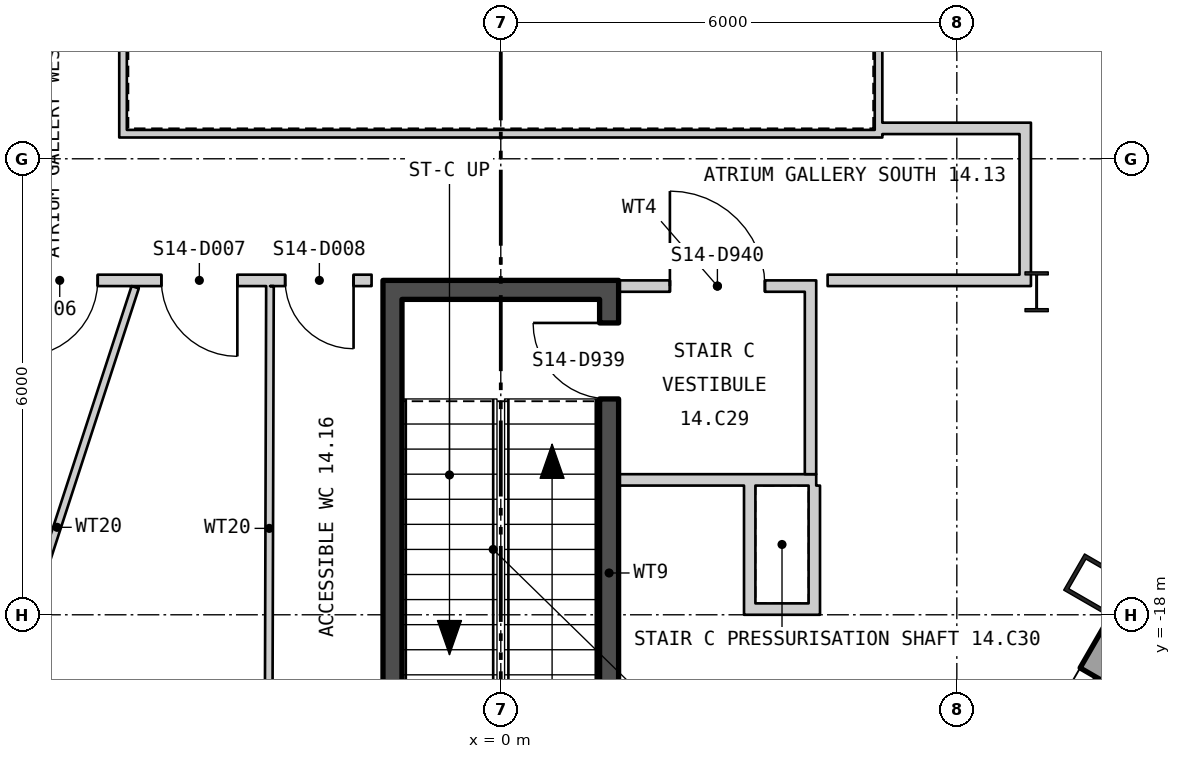
"""IFC4 building model, lengths in metres.
Left out: names, types, materials, properties, quantities, classifications, styles, units other than length and angle.
Written with IfcOpenShell. Run it as: python <this file> out.ifc"""

import sys

from ifc_helpers import new_model, si_unit, direction, frame, frame_2d, origin, origin_2d, place, context, subcontext, project, spatial, polyline, rectangle, hollow_rectangle, i_section, outline, extrude, element, fill, save


model = new_model("IFC4")
c1 = context("Model", 3, precision=1e-05, world=origin(), true_north=direction((0.0, 1.0)))
c2 = subcontext(c1, "Body", "Model", "MODEL_VIEW")
j1 = project(units=[si_unit("LENGTHUNIT", "METRE"), si_unit("PLANEANGLEUNIT", "RADIAN")], contexts=[c1])
p1 = place(None, origin())
s1 = spatial("IfcSite", under=j1, at=p1, CompositionType="ELEMENT")
p2 = place(p1, origin())
s2 = spatial("IfcBuilding", under=s1, at=p2, CompositionType="ELEMENT")
p3 = place(p2, frame((0.0, 0.0, 192.6)))
s3 = spatial("IfcBuildingStorey", under=s2, at=p3, CompositionType="ELEMENT", Elevation=192.6)
p4 = place(p3, frame((7.846, -17.612, 0.0), z_axis=(0.0, 0.0, 1.0), x_axis=(0.5, 0.866025403784, 0.0)))
e1 = element("IfcColumn", 1, at=p4, inside=s3, PredefinedType="COLUMN", context=c2, shape_type="SweptSolid", body=[
    extrude(hollow_rectangle(XDim=0.55, YDim=0.7, WallThickness=0.05, at=origin_2d()), origin(), (0.0, 0.0, 1.0), 3.9),
])
p5 = place(p3, frame((7.05, -13.75, 0.0), z_axis=(0.0, 0.0, 1.0), x_axis=(1.0, 0.0, 0.0)))
e2 = element("IfcColumn", 2, at=p5, inside=s3, PredefinedType="COLUMN", context=c2, shape_type="SweptSolid", body=[
    extrude(i_section(OverallWidth=0.306, OverallDepth=0.524, WebThickness=0.021, FlangeThickness=0.04, at=origin_2d()), origin(), (0.0, 0.0, 1.0), 3.9),
])
p6 = place(p3, frame((-26.54, 13.618, -0.18), z_axis=(0.0, 0.0, 1.0), x_axis=(0.499999764979, -0.866025539474, 0.0)))
e3 = element("IfcWall", 3, at=p6, inside=s3, PredefinedType="SOLIDWALL", context=c2, shape_type="SweptSolid", body=[
    extrude(outline(polyline([(-0.13, -0.225), (45.87, -0.225), (45.61, 0.225), (0.13, 0.225), (-0.13, -0.225)])), origin(), (0.0, 0.0, 1.0), 3.68),
])
p7 = place(p6, frame((1.424, 0.0, 1.08)))
e4 = element("IfcOpeningElement", 4, at=p7, cuts=e3, PredefinedType="OPENING", context=c2, shape_type="SweptSolid", body=[
    extrude(rectangle(XDim=2.4, YDim=2.0, at=frame_2d((1.2, 1.0))), frame((0.0, 0.235, 0.0), z_axis=(0.0, -1.0, 0.0), x_axis=(1.0, 0.0, 0.0)), (0.0, 0.0, 1.0), 0.47),
])
p8 = place(p6, frame((5.893, 0.0, 1.08)))
e5 = element("IfcOpeningElement", 5, at=p8, cuts=e3, PredefinedType="OPENING", context=c2, shape_type="SweptSolid", body=[
    extrude(rectangle(XDim=2.4, YDim=2.0, at=frame_2d((1.2, 1.0))), frame((0.0, 0.235, 0.0), z_axis=(0.0, -1.0, 0.0), x_axis=(1.0, 0.0, 0.0)), (0.0, 0.0, 1.0), 0.47),
])
p9 = place(p6, frame((10.401, 0.0, 1.08)))
e6 = element("IfcOpeningElement", 6, at=p9, cuts=e3, PredefinedType="OPENING", context=c2, shape_type="SweptSolid", body=[
    extrude(rectangle(XDim=2.4, YDim=2.0, at=frame_2d((1.2, 1.0))), frame((0.0, 0.235, 0.0), z_axis=(0.0, -1.0, 0.0), x_axis=(1.0, 0.0, 0.0)), (0.0, 0.0, 1.0), 0.47),
])
p10 = place(p6, frame((14.909, 0.0, 1.08)))
e7 = element("IfcOpeningElement", 7, at=p10, cuts=e3, PredefinedType="OPENING", context=c2, shape_type="SweptSolid", body=[
    extrude(rectangle(XDim=2.4, YDim=2.0, at=frame_2d((1.2, 1.0))), frame((0.0, 0.235, 0.0), z_axis=(0.0, -1.0, 0.0), x_axis=(1.0, 0.0, 0.0)), (0.0, 0.0, 1.0), 0.47),
])
p11 = place(p6, frame((19.416, 0.0, 1.08)))
e8 = element("IfcOpeningElement", 8, at=p11, cuts=e3, PredefinedType="OPENING", context=c2, shape_type="SweptSolid", body=[
    extrude(rectangle(XDim=2.4, YDim=2.0, at=frame_2d((1.2, 1.0))), frame((0.0, 0.235, 0.0), z_axis=(0.0, -1.0, 0.0), x_axis=(1.0, 0.0, 0.0)), (0.0, 0.0, 1.0), 0.47),
])
p12 = place(p6, frame((23.924, 0.0, 1.08)))
e9 = element("IfcOpeningElement", 9, at=p12, cuts=e3, PredefinedType="OPENING", context=c2, shape_type="SweptSolid", body=[
    extrude(rectangle(XDim=2.4, YDim=2.0, at=frame_2d((1.2, 1.0))), frame((0.0, 0.235, 0.0), z_axis=(0.0, -1.0, 0.0), x_axis=(1.0, 0.0, 0.0)), (0.0, 0.0, 1.0), 0.47),
])
p13 = place(p6, frame((28.431, 0.0, 1.08)))
e10 = element("IfcOpeningElement", 10, at=p13, cuts=e3, PredefinedType="OPENING", context=c2, shape_type="SweptSolid", body=[
    extrude(rectangle(XDim=2.4, YDim=2.0, at=frame_2d((1.2, 1.0))), frame((0.0, 0.235, 0.0), z_axis=(0.0, -1.0, 0.0), x_axis=(1.0, 0.0, 0.0)), (0.0, 0.0, 1.0), 0.47),
])
p14 = place(p6, frame((32.939, 0.0, 1.08)))
e11 = element("IfcOpeningElement", 11, at=p14, cuts=e3, PredefinedType="OPENING", context=c2, shape_type="SweptSolid", body=[
    extrude(rectangle(XDim=2.4, YDim=2.0, at=frame_2d((1.2, 1.0))), frame((0.0, 0.235, 0.0), z_axis=(0.0, -1.0, 0.0), x_axis=(1.0, 0.0, 0.0)), (0.0, 0.0, 1.0), 0.47),
])
p15 = place(p6, frame((41.916, 0.0, 1.08)))
e12 = element("IfcOpeningElement", 12, at=p15, cuts=e3, PredefinedType="OPENING", context=c2, shape_type="SweptSolid", body=[
    extrude(rectangle(XDim=2.4, YDim=2.0, at=frame_2d((1.2, 1.0))), frame((0.0, 0.235, 0.0), z_axis=(0.0, -1.0, 0.0), x_axis=(1.0, 0.0, 0.0)), (0.0, 0.0, 1.0), 0.47),
])
p16 = place(p3, frame((3.67, -25.994, -0.18), z_axis=(0.0, 0.0, 1.0), x_axis=(0.499999764979, 0.866025539474, 0.0)))
e13 = element("IfcWall", 13, at=p16, inside=s3, PredefinedType="SOLIDWALL", context=c2, shape_type="SweptSolid", body=[
    extrude(outline(polyline([(-0.13, -0.225), (45.87, -0.225), (45.61, 0.225), (0.13, 0.225), (-0.13, -0.225)])), origin(), (0.0, 0.0, 1.0), 3.68),
])
p17 = place(p16, frame((1.424, 0.0, 1.08)))
e14 = element("IfcOpeningElement", 14, at=p17, cuts=e13, PredefinedType="OPENING", context=c2, shape_type="SweptSolid", body=[
    extrude(rectangle(XDim=2.4, YDim=2.0, at=frame_2d((1.2, 1.0))), frame((0.0, 0.235, 0.0), z_axis=(0.0, -1.0, 0.0), x_axis=(1.0, 0.0, 0.0)), (0.0, 0.0, 1.0), 0.47),
])
p18 = place(p16, frame((5.893, 0.0, 1.08)))
e15 = element("IfcOpeningElement", 15, at=p18, cuts=e13, PredefinedType="OPENING", context=c2, shape_type="SweptSolid", body=[
    extrude(rectangle(XDim=2.4, YDim=2.0, at=frame_2d((1.2, 1.0))), frame((0.0, 0.235, 0.0), z_axis=(0.0, -1.0, 0.0), x_axis=(1.0, 0.0, 0.0)), (0.0, 0.0, 1.0), 0.47),
])
p19 = place(p16, frame((10.401, 0.0, 1.08)))
e16 = element("IfcOpeningElement", 16, at=p19, cuts=e13, PredefinedType="OPENING", context=c2, shape_type="SweptSolid", body=[
    extrude(rectangle(XDim=2.4, YDim=2.0, at=frame_2d((1.2, 1.0))), frame((0.0, 0.235, 0.0), z_axis=(0.0, -1.0, 0.0), x_axis=(1.0, 0.0, 0.0)), (0.0, 0.0, 1.0), 0.47),
])
p20 = place(p16, frame((14.909, 0.0, 1.08)))
e17 = element("IfcOpeningElement", 17, at=p20, cuts=e13, PredefinedType="OPENING", context=c2, shape_type="SweptSolid", body=[
    extrude(rectangle(XDim=2.4, YDim=2.0, at=frame_2d((1.2, 1.0))), frame((0.0, 0.235, 0.0), z_axis=(0.0, -1.0, 0.0), x_axis=(1.0, 0.0, 0.0)), (0.0, 0.0, 1.0), 0.47),
])
p21 = place(p16, frame((19.416, 0.0, 1.08)))
e18 = element("IfcOpeningElement", 18, at=p21, cuts=e13, PredefinedType="OPENING", context=c2, shape_type="SweptSolid", body=[
    extrude(rectangle(XDim=2.4, YDim=2.0, at=frame_2d((1.2, 1.0))), frame((0.0, 0.235, 0.0), z_axis=(0.0, -1.0, 0.0), x_axis=(1.0, 0.0, 0.0)), (0.0, 0.0, 1.0), 0.47),
])
p22 = place(p16, frame((23.924, 0.0, 1.08)))
e19 = element("IfcOpeningElement", 19, at=p22, cuts=e13, PredefinedType="OPENING", context=c2, shape_type="SweptSolid", body=[
    extrude(rectangle(XDim=2.4, YDim=2.0, at=frame_2d((1.2, 1.0))), frame((0.0, 0.235, 0.0), z_axis=(0.0, -1.0, 0.0), x_axis=(1.0, 0.0, 0.0)), (0.0, 0.0, 1.0), 0.47),
])
p23 = place(p16, frame((28.431, 0.0, 1.08)))
e20 = element("IfcOpeningElement", 20, at=p23, cuts=e13, PredefinedType="OPENING", context=c2, shape_type="SweptSolid", body=[
    extrude(rectangle(XDim=2.4, YDim=2.0, at=frame_2d((1.2, 1.0))), frame((0.0, 0.235, 0.0), z_axis=(0.0, -1.0, 0.0), x_axis=(1.0, 0.0, 0.0)), (0.0, 0.0, 1.0), 0.47),
])
p24 = place(p16, frame((32.939, 0.0, 1.08)))
e21 = element("IfcOpeningElement", 21, at=p24, cuts=e13, PredefinedType="OPENING", context=c2, shape_type="SweptSolid", body=[
    extrude(rectangle(XDim=2.4, YDim=2.0, at=frame_2d((1.2, 1.0))), frame((0.0, 0.235, 0.0), z_axis=(0.0, -1.0, 0.0), x_axis=(1.0, 0.0, 0.0)), (0.0, 0.0, 1.0), 0.47),
])
p25 = place(p16, frame((37.447, 0.0, 1.08)))
e22 = element("IfcOpeningElement", 22, at=p25, cuts=e13, PredefinedType="OPENING", context=c2, shape_type="SweptSolid", body=[
    extrude(rectangle(XDim=2.4, YDim=2.0, at=frame_2d((1.2, 1.0))), frame((0.0, 0.235, 0.0), z_axis=(0.0, -1.0, 0.0), x_axis=(1.0, 0.0, 0.0)), (0.0, 0.0, 1.0), 0.47),
])
p26 = place(p16, frame((41.916, 0.0, 1.08)))
e23 = element("IfcOpeningElement", 23, at=p26, cuts=e13, PredefinedType="OPENING", context=c2, shape_type="SweptSolid", body=[
    extrude(rectangle(XDim=2.4, YDim=2.0, at=frame_2d((1.2, 1.0))), frame((0.0, 0.235, 0.0), z_axis=(0.0, -1.0, 0.0), x_axis=(1.0, 0.0, 0.0)), (0.0, 0.0, 1.0), 0.47),
])
p27 = place(p3, frame((-5.02, -11.67, 0.0), z_axis=(0.0, 0.0, 1.0), x_axis=(1.0, 0.0, 0.0)))
e24 = element("IfcWall", 24, at=p27, inside=s3, PredefinedType="PARTITIONING", context=c2, shape_type="SweptSolid", body=[
    extrude(rectangle(XDim=10.04, YDim=0.1, at=frame_2d((5.02, 0.0))), origin(), (0.0, 0.0, 1.0), 3.7),
])
for number, where, z_axis, x_axis in (
    (25, (4.97, -11.62, 0.0), (0.0, 0.0, 1.0), (0.0, 1.0, 0.0)),
    (26, (-4.97, -3.58, 0.0), (0.0, 0.0, 1.0), (0.0, -1.0, 0.0)),
):
    element("IfcWall", number, at=place(p3, frame(where, z_axis=z_axis, x_axis=x_axis)), inside=s3, PredefinedType="PARTITIONING", context=c2, shape_type="SweptSolid", body=[
        extrude(rectangle(XDim=8.04, YDim=0.1, at=frame_2d((4.02, 0.0))), origin(), (0.0, 0.0, 1.0), 3.7),
    ])
p28 = place(p3, frame((-1.425, -21.05, 0.0), z_axis=(0.0, 0.0, 1.0), x_axis=(0.0, 1.0, 0.0)))
e27 = element("IfcWall", 27, at=p28, inside=s3, PredefinedType="SHEAR", context=c2, shape_type="SweptSolid", body=[
    extrude(rectangle(XDim=7.2, YDim=0.25, at=frame_2d((3.6, 0.0))), origin(), (0.0, 0.0, 1.0), 3.7),
])
p29 = place(p3, frame((1.425, -21.05, 0.0), z_axis=(0.0, 0.0, 1.0), x_axis=(0.0, 1.0, 0.0)))
e28 = element("IfcWall", 28, at=p29, inside=s3, PredefinedType="SHEAR", context=c2, shape_type="SweptSolid", body=[
    extrude(rectangle(XDim=7.2, YDim=0.25, at=frame_2d((3.6, 0.0))), origin(), (0.0, 0.0, 1.0), 3.7),
])
p30 = place(p29, frame((5.89, 0.0, 0.0)))
e29 = element("IfcOpeningElement", 29, at=p30, cuts=e28, PredefinedType="OPENING", context=c2, shape_type="SweptSolid", body=[
    extrude(rectangle(XDim=1.0, YDim=2.1, at=frame_2d((0.5, 1.05))), frame((0.0, 0.135, 0.0), z_axis=(0.0, -1.0, 0.0), x_axis=(1.0, 0.0, 0.0)), (0.0, 0.0, 1.0), 0.27),
])
p31 = place(p3, frame((-1.55, -13.725, 0.0), z_axis=(0.0, 0.0, 1.0), x_axis=(1.0, 0.0, 0.0)))
e30 = element("IfcWall", 30, at=p31, inside=s3, PredefinedType="SHEAR", context=c2, shape_type="SweptSolid", body=[
    extrude(rectangle(XDim=3.1, YDim=0.25, at=frame_2d((1.55, 0.0))), origin(), (0.0, 0.0, 1.0), 3.7),
])
p32 = place(p3, frame((1.55, -16.225, 0.0), z_axis=(0.0, 0.0, 1.0), x_axis=(1.0, 0.0, 0.0)))
e31 = element("IfcWall", 31, at=p32, inside=s3, PredefinedType="PARTITIONING", context=c2, shape_type="SweptSolid", body=[
    extrude(rectangle(XDim=2.6, YDim=0.15, at=frame_2d((1.3, 0.0))), origin(), (0.0, 0.0, 1.0), 3.7),
])
p33 = place(p3, frame((4.075, -16.15, 0.0), z_axis=(0.0, 0.0, 1.0), x_axis=(0.0, 1.0, 0.0)))
e32 = element("IfcWall", 32, at=p33, inside=s3, PredefinedType="PARTITIONING", context=c2, shape_type="SweptSolid", body=[
    extrude(rectangle(XDim=2.4, YDim=0.15, at=frame_2d((1.2, 0.0))), origin(), (0.0, 0.0, 1.0), 3.7),
])
p34 = place(p3, frame((1.55, -13.675, 0.0), z_axis=(0.0, 0.0, 1.0), x_axis=(1.0, 0.0, 0.0)))
e33 = element("IfcWall", 33, at=p34, inside=s3, PredefinedType="PARTITIONING", context=c2, shape_type="SweptSolid", body=[
    extrude(rectangle(XDim=2.6, YDim=0.15, at=frame_2d((1.3, 0.0))), origin(), (0.0, 0.0, 1.0), 2.91),
])
p35 = place(p34, frame((0.675, 0.0, 0.0)))
e34 = element("IfcOpeningElement", 34, at=p35, cuts=e33, PredefinedType="OPENING", context=c2, shape_type="SweptSolid", body=[
    extrude(rectangle(XDim=1.25, YDim=2.1, at=frame_2d((0.625, 1.05))), frame((0.0, 0.085, 0.0), z_axis=(0.0, -1.0, 0.0), x_axis=(1.0, 0.0, 0.0)), (0.0, 0.0, 1.0), 0.17),
])
p36 = place(p3, frame((3.275, -18.0, 0.0), z_axis=(0.0, 0.0, 1.0), x_axis=(0.0, 1.0, 0.0)))
e35 = element("IfcWall", 35, at=p36, inside=s3, PredefinedType="PARTITIONING", context=c2, shape_type="SweptSolid", body=[
    extrude(rectangle(XDim=1.7, YDim=0.15, at=frame_2d((0.85, 0.0))), origin(), (0.0, 0.0, 1.0), 3.01),
])
p37 = place(p3, frame((3.35, -17.925, 0.0), z_axis=(0.0, 0.0, 1.0), x_axis=(1.0, 0.0, 0.0)))
e36 = element("IfcWall", 36, at=p37, inside=s3, PredefinedType="PARTITIONING", context=c2, shape_type="SweptSolid", body=[
    extrude(rectangle(XDim=0.7, YDim=0.15, at=frame_2d((0.35, 0.0))), origin(), (0.0, 0.0, 1.0), 3.7),
])
p38 = place(p3, frame((4.125, -18.0, 0.0), z_axis=(0.0, 0.0, 1.0), x_axis=(0.0, 1.0, 0.0)))
e37 = element("IfcWall", 37, at=p38, inside=s3, PredefinedType="PARTITIONING", context=c2, shape_type="SweptSolid", body=[
    extrude(rectangle(XDim=1.7, YDim=0.15, at=frame_2d((0.85, 0.0))), origin(), (0.0, 0.0, 1.0), 3.7),
])
p39 = place(p3, frame((-6.866, -20.008, 0.0), z_axis=(0.0, 0.0, 1.0), x_axis=(0.309446795586, 0.95091675803, 0.0)))
e38 = element("IfcWall", 38, at=p39, inside=s3, PredefinedType="PARTITIONING", context=c2, shape_type="SweptSolid", body=[
    extrude(rectangle(XDim=6.644, YDim=0.1, at=frame_2d((3.322, 0.0))), origin(), (0.0, 0.0, 1.0), 3.7),
])
p40 = place(p3, frame((-6.825, -13.6, 0.0), z_axis=(0.0, 0.0, 1.0), x_axis=(1.0, 0.0, 0.0)))
e39 = element("IfcWall", 39, at=p40, inside=s3, PredefinedType="PARTITIONING", context=c2, shape_type="SweptSolid", body=[
    extrude(rectangle(XDim=5.125, YDim=0.15, at=frame_2d((2.562, 0.0))), origin(), (0.0, 0.0, 1.0), 2.91),
])
p41 = place(p40, frame((0.522, 0.0, 0.0)))
e40 = element("IfcOpeningElement", 40, at=p41, cuts=e39, PredefinedType="OPENING", context=c2, shape_type="SweptSolid", body=[
    extrude(rectangle(XDim=1.0, YDim=2.1, at=frame_2d((0.5, 1.05))), frame((0.0, 0.085, 0.0), z_axis=(0.0, -1.0, 0.0), x_axis=(1.0, 0.0, 0.0)), (0.0, 0.0, 1.0), 0.17),
])
p42 = place(p40, frame((2.359, 0.0, 0.0)))
e41 = element("IfcOpeningElement", 41, at=p42, cuts=e39, PredefinedType="OPENING", context=c2, shape_type="SweptSolid", body=[
    extrude(rectangle(XDim=1.0, YDim=2.1, at=frame_2d((0.5, 1.05))), frame((0.0, 0.085, 0.0), z_axis=(0.0, -1.0, 0.0), x_axis=(1.0, 0.0, 0.0)), (0.0, 0.0, 1.0), 0.17),
])
p43 = place(p40, frame((3.988, 0.0, 0.0)))
e42 = element("IfcOpeningElement", 42, at=p43, cuts=e39, PredefinedType="OPENING", context=c2, shape_type="SweptSolid", body=[
    extrude(rectangle(XDim=0.9, YDim=2.1, at=frame_2d((0.45, 1.05))), frame((0.0, 0.085, 0.0), z_axis=(0.0, -1.0, 0.0), x_axis=(1.0, 0.0, 0.0)), (0.0, 0.0, 1.0), 0.17),
])
p44 = place(p3, frame((-3.056, -20.051, 0.0), z_axis=(0.0, 0.0, 1.0), x_axis=(0.002979911487, 0.999995560054, 0.0)))
e43 = element("IfcWall", 43, at=p44, inside=s3, PredefinedType="PARTITIONING", context=c2, shape_type="SweptSolid", body=[
    extrude(rectangle(XDim=6.376, YDim=0.1, at=frame_2d((3.188, 0.0))), origin(), (0.0, 0.0, 1.0), 3.01),
])
p45 = place(p3, frame((4.3, -13.6, 0.0), z_axis=(0.0, 0.0, 1.0), x_axis=(1.0, 0.0, 0.0)))
e44 = element("IfcWall", 44, at=p45, inside=s3, PredefinedType="PARTITIONING", context=c2, shape_type="SweptSolid", body=[
    extrude(rectangle(XDim=2.675, YDim=0.15, at=frame_2d((1.337, 0.0))), origin(), (0.0, 0.0, 1.0), 2.91),
])
p46 = place(p3, frame((5.02, -11.6, 0.0), z_axis=(0.0, 0.0, 1.0), x_axis=(1.0, 0.0, 0.0)))
e45 = element("IfcWall", 45, at=p46, inside=s3, PredefinedType="PARTITIONING", context=c2, shape_type="SweptSolid", body=[
    extrude(rectangle(XDim=1.805, YDim=0.15, at=frame_2d((0.902, 0.0))), origin(), (0.0, 0.0, 1.0), 3.7),
])
p47 = place(p3, frame((6.9, -13.525, 0.0), z_axis=(0.0, 0.0, 1.0), x_axis=(0.0, 1.0, 0.0)))
e46 = element("IfcWall", 46, at=p47, inside=s3, PredefinedType="PARTITIONING", context=c2, shape_type="SweptSolid", body=[
    extrude(rectangle(XDim=2.0, YDim=0.15, at=frame_2d((1.0, 0.0))), origin(), (0.0, 0.0, 1.0), 3.11),
])
p48 = place(p18, origin())
e47 = element("IfcWindow", 47, at=p48, inside=s3, PartitioningType="SINGLE_PANEL", PredefinedType="WINDOW", context=c2, shape_type="SweptSolid", body=[
    extrude(rectangle(XDim=2.4, YDim=2.0, at=frame_2d((1.2, 1.0))), frame((0.0, 0.105, 0.0), z_axis=(0.0, -1.0, 0.0), x_axis=(1.0, 0.0, 0.0)), (0.0, 0.0, 1.0), 0.06),
])
fill(e15, e47)
p49 = place(p30, origin())
e48 = element("IfcDoor", 48, at=p49, inside=s3, OperationType="SINGLE_SWING_LEFT", PredefinedType="DOOR", context=c2, shape_type="SweptSolid", body=[
    extrude(rectangle(XDim=1.0, YDim=2.1, at=frame_2d((0.5, 1.05))), frame((0.0, 0.025, 0.0), z_axis=(0.0, -1.0, 0.0), x_axis=(1.0, 0.0, 0.0)), (0.0, 0.0, 1.0), 0.05),
])
fill(e29, e48)
p50 = place(p35, origin())
e49 = element("IfcDoor", 49, at=p50, inside=s3, OperationType="SINGLE_SWING_RIGHT", PredefinedType="DOOR", context=c2, shape_type="SweptSolid", body=[
    extrude(rectangle(XDim=1.25, YDim=2.1, at=frame_2d((0.625, 1.05))), frame((0.0, 0.025, 0.0), z_axis=(0.0, -1.0, 0.0), x_axis=(1.0, 0.0, 0.0)), (0.0, 0.0, 1.0), 0.05),
])
fill(e34, e49)
p51 = place(p41, origin())
e50 = element("IfcDoor", 50, at=p51, inside=s3, OperationType="SINGLE_SWING_LEFT", PredefinedType="DOOR", context=c2, shape_type="SweptSolid", body=[
    extrude(rectangle(XDim=1.0, YDim=2.1, at=frame_2d((0.5, 1.05))), frame((0.0, 0.025, 0.0), z_axis=(0.0, -1.0, 0.0), x_axis=(1.0, 0.0, 0.0)), (0.0, 0.0, 1.0), 0.05),
])
fill(e40, e50)
p52 = place(p42, origin())
e51 = element("IfcDoor", 51, at=p52, inside=s3, OperationType="SINGLE_SWING_RIGHT", PredefinedType="DOOR", context=c2, shape_type="SweptSolid", body=[
    extrude(rectangle(XDim=1.0, YDim=2.1, at=frame_2d((0.5, 1.05))), frame((0.0, 0.025, 0.0), z_axis=(0.0, -1.0, 0.0), x_axis=(1.0, 0.0, 0.0)), (0.0, 0.0, 1.0), 0.05),
])
fill(e41, e51)
p53 = place(p43, origin())
e52 = element("IfcDoor", 52, at=p53, inside=s3, OperationType="SINGLE_SWING_RIGHT", PredefinedType="DOOR", context=c2, shape_type="SweptSolid", body=[
    extrude(rectangle(XDim=0.9, YDim=2.1, at=frame_2d((0.45, 1.05))), frame((0.0, 0.025, 0.0), z_axis=(0.0, -1.0, 0.0), x_axis=(1.0, 0.0, 0.0)), (0.0, 0.0, 1.0), 0.05),
])
fill(e42, e52)
save(model, sys.argv[1])
